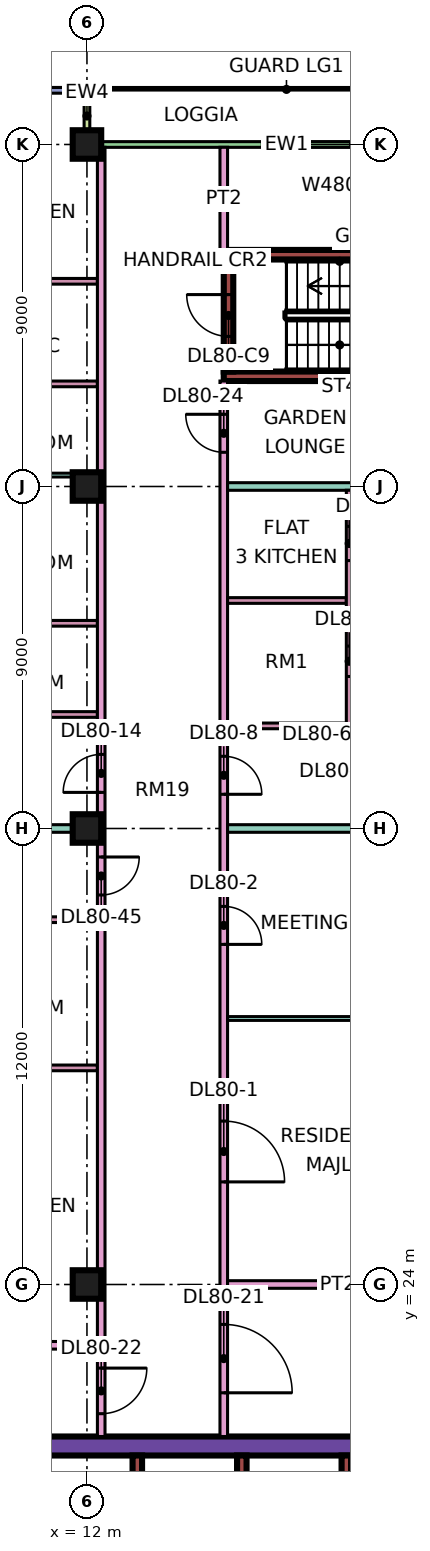
"""IFC4 building model, lengths in metres.
Left out: names, types, materials, properties, quantities, classifications, styles, units other than length and angle.
Written with IfcOpenShell. Run it as: python <this file> out.ifc"""

import sys

from ifc_helpers import new_model, si_unit, direction, frame, frame_2d, origin, origin_2d, place, context, subcontext, project, spatial, rectangle, extrude, element, fill, save


model = new_model("IFC4")
c1 = context("Model", 3, precision=1e-05, world=origin(), true_north=direction((0.0, 1.0)))
c2 = subcontext(c1, "Body", "Model", "MODEL_VIEW")
j1 = project(units=[si_unit("LENGTHUNIT", "METRE"), si_unit("PLANEANGLEUNIT", "RADIAN")], contexts=[c1])
p1 = place(None, origin())
s1 = spatial("IfcSite", under=j1, at=p1, CompositionType="ELEMENT")
p2 = place(p1, origin())
s2 = spatial("IfcBuilding", under=s1, at=p2, CompositionType="ELEMENT")
p3 = place(p2, frame((0.0, 0.0, 346.4)))
s3 = spatial("IfcBuildingStorey", under=s2, at=p3, CompositionType="ELEMENT", Elevation=346.4)
for number, where, z_axis, x_axis in (
    (1, (12.0, 24.0, 0.0), (0.0, 0.0, 1.0), (1.0, 0.0, 0.0)),
    (2, (12.0, 36.0, 0.0), (0.0, 0.0, 1.0), (1.0, 0.0, 0.0)),
    (3, (12.0, 45.0, 0.0), (0.0, 0.0, 1.0), (1.0, 0.0, 0.0)),
    (4, (12.0, 54.0, 0.0), (0.0, 0.0, 1.0), (1.0, 0.0, 0.0)),
):
    element("IfcColumn", number, at=place(p3, frame(where, z_axis=z_axis, x_axis=x_axis)), inside=s3, PredefinedType="COLUMN", context=c2, shape_type="SweptSolid", body=[
        extrude(rectangle(XDim=0.75, YDim=0.75, at=origin_2d()), origin(), (0.0, 0.0, 1.0), 3.75),
    ])
p4 = place(p3, frame((9.0, 19.75, 0.0), z_axis=(0.0, 0.0, 1.0), x_axis=(1.0, 0.0, 0.0)))
e5 = element("IfcWall", 5, at=p4, inside=s3, PredefinedType="SHEAR", context=c2, shape_type="SweptSolid", body=[
    extrude(rectangle(XDim=25.0, YDim=0.5, at=frame_2d((12.5, 0.0))), origin(), (0.0, 0.0, 1.0), 3.75),
])
p5 = place(p4, frame((19.1, 0.0, 0.0)))
e6 = element("IfcOpeningElement", 6, at=p5, cuts=e5, PredefinedType="OPENING", context=c2, shape_type="SweptSolid", body=[
    extrude(rectangle(XDim=1.8, YDim=2.4, at=frame_2d((0.9, 1.2))), frame((0.0, 0.26, 0.0), z_axis=(0.0, -1.0, 0.0), x_axis=(1.0, 0.0, 0.0)), (0.0, 0.0, 1.0), 0.52),
])
p6 = place(p3, frame((13.325, 7.5, 0.0), z_axis=(0.0, 0.0, 1.0), x_axis=(0.0, 1.0, 0.0)))
e7 = element("IfcWall", 7, at=p6, inside=s3, PredefinedType="SHEAR", context=c2, shape_type="SweptSolid", body=[
    extrude(rectangle(XDim=12.0, YDim=0.25, at=frame_2d((6.0, 0.0))), origin(), (0.0, 0.0, 1.0), 3.75),
])
for number, where, z_axis, x_axis in (
    (8, (16.075, 15.8, 0.0), (0.0, 0.0, 1.0), (0.0, 1.0, 0.0)),
    (9, (18.825, 15.8, 0.0), (0.0, 0.0, 1.0), (0.0, 1.0, 0.0)),
):
    element("IfcWall", number, at=place(p3, frame(where, z_axis=z_axis, x_axis=x_axis)), inside=s3, PredefinedType="SHEAR", context=c2, shape_type="SweptSolid", body=[
        extrude(rectangle(XDim=3.7, YDim=0.25, at=frame_2d((1.85, 0.0))), origin(), (0.0, 0.0, 1.0), 3.75),
    ])
for number, where, z_axis, x_axis in (
    (10, (15.6, 47.9, 0.0), (0.0, 0.0, 1.0), (1.0, 0.0, 0.0)),
    (11, (15.6, 51.1, 0.0), (0.0, 0.0, 1.0), (1.0, 0.0, 0.0)),
):
    element("IfcWall", number, at=place(p3, frame(where, z_axis=z_axis, x_axis=x_axis)), inside=s3, PredefinedType="SHEAR", context=c2, shape_type="SweptSolid", body=[
        extrude(rectangle(XDim=7.0, YDim=0.25, at=frame_2d((3.5, 0.0))), origin(), (0.0, 0.0, 1.0), 3.75),
    ])
p7 = place(p3, frame((15.725, 48.025, 0.0), z_axis=(0.0, 0.0, 1.0), x_axis=(0.0, 1.0, 0.0)))
e12 = element("IfcWall", 12, at=p7, inside=s3, PredefinedType="SHEAR", context=c2, shape_type="SweptSolid", body=[
    extrude(rectangle(XDim=2.95, YDim=0.25, at=frame_2d((1.475, 0.0))), origin(), (0.0, 0.0, 1.0), 3.75),
])
p8 = place(p7, frame((0.925, 0.0, 0.0)))
e13 = element("IfcOpeningElement", 13, at=p8, cuts=e12, PredefinedType="OPENING", context=c2, shape_type="SweptSolid", body=[
    extrude(rectangle(XDim=1.1, YDim=2.2, at=frame_2d((0.55, 1.1))), frame((0.0, 0.135, 0.0), z_axis=(0.0, -1.0, 0.0), x_axis=(1.0, 0.0, 0.0)), (0.0, 0.0, 1.0), 0.27),
])
p9 = place(p3, frame((22.425, 54.0, 0.0), z_axis=(0.0, 0.0, 1.0), x_axis=(-1.0, 0.0, 0.0)))
e14 = element("IfcWall", 14, at=p9, inside=s3, PredefinedType="SOLIDWALL", context=c2, shape_type="SweptSolid", body=[
    extrude(rectangle(XDim=10.35, YDim=0.15, at=frame_2d((5.175, 0.0))), origin(), (0.0, 0.0, 1.0), 3.35),
])
p10 = place(p9, frame((1.012, 0.0, 0.45)))
e15 = element("IfcOpeningElement", 15, at=p10, cuts=e14, PredefinedType="OPENING", context=c2, shape_type="SweptSolid", body=[
    extrude(rectangle(XDim=4.8, YDim=2.4, at=frame_2d((2.4, 1.2))), frame((0.0, 0.085, 0.0), z_axis=(0.0, -1.0, 0.0), x_axis=(1.0, 0.0, 0.0)), (0.0, 0.0, 1.0), 0.17),
])
p11 = place(p3, frame((12.0, 55.5, 0.0), z_axis=(0.0, 0.0, 1.0), x_axis=(0.0, -1.0, 0.0)))
e16 = element("IfcWall", 16, at=p11, inside=s3, PredefinedType="SOLIDWALL", context=c2, shape_type="SweptSolid", body=[
    extrude(rectangle(XDim=1.5, YDim=0.15, at=frame_2d((0.75, 0.0))), origin(), (0.0, 0.0, 1.0), 3.35),
])
p12 = place(p3, frame((11.925, 55.425, 0.0), z_axis=(0.0, 0.0, 1.0), x_axis=(-1.0, 0.0, 0.0)))
e17 = element("IfcWall", 17, at=p12, inside=s3, PredefinedType="SOLIDWALL", context=c2, shape_type="SweptSolid", body=[
    extrude(rectangle(XDim=10.425, YDim=0.15, at=frame_2d((5.212, 0.0))), origin(), (0.0, 0.0, 1.0), 3.35),
])
p13 = place(p12, frame((0.975, 0.0, 0.45)))
e18 = element("IfcOpeningElement", 18, at=p13, cuts=e17, PredefinedType="OPENING", context=c2, shape_type="SweptSolid", body=[
    extrude(rectangle(XDim=3.0, YDim=2.4, at=frame_2d((1.5, 1.2))), frame((0.0, 0.085, 0.0), z_axis=(0.0, -1.0, 0.0), x_axis=(1.0, 0.0, 0.0)), (0.0, 0.0, 1.0), 0.17),
])
p14 = place(p12, frame((6.188, 0.0, 0.45)))
e19 = element("IfcOpeningElement", 19, at=p14, cuts=e17, PredefinedType="OPENING", context=c2, shape_type="SweptSolid", body=[
    extrude(rectangle(XDim=3.0, YDim=2.4, at=frame_2d((1.5, 1.2))), frame((0.0, 0.085, 0.0), z_axis=(0.0, -1.0, 0.0), x_axis=(1.0, 0.0, 0.0)), (0.0, 0.0, 1.0), 0.17),
])
p15 = place(p3, frame((0.0, 36.0, 0.0), z_axis=(0.0, 0.0, 1.0), x_axis=(1.0, 0.0, 0.0)))
e20 = element("IfcWall", 20, at=p15, inside=s3, PredefinedType="PARTITIONING", context=c2, shape_type="SweptSolid", body=[
    extrude(rectangle(XDim=12.275, YDim=0.2, at=frame_2d((6.137, 0.0))), origin(), (0.0, 0.0, 1.0), 3.35),
])
p16 = place(p3, frame((0.074, 22.4, 0.0), z_axis=(0.0, 0.0, 1.0), x_axis=(1.0, 0.0, 0.0)))
e21 = element("IfcWall", 21, at=p16, inside=s3, PredefinedType="PARTITIONING", context=c2, shape_type="SweptSolid", body=[
    extrude(rectangle(XDim=12.201, YDim=0.2, at=frame_2d((6.101, 0.0))), origin(), (0.0, 0.0, 1.0), 3.35),
])
p17 = place(p3, frame((7.05, 29.7, 0.0), z_axis=(0.0, 0.0, 1.0), x_axis=(1.0, 0.0, 0.0)))
e22 = element("IfcWall", 22, at=p17, inside=s3, PredefinedType="PARTITIONING", context=c2, shape_type="SweptSolid", body=[
    extrude(rectangle(XDim=5.225, YDim=0.15, at=frame_2d((2.612, 0.0))), origin(), (0.0, 0.0, 1.0), 3.35),
])
p18 = place(p3, frame((7.05, 33.6, 0.0), z_axis=(0.0, 0.0, 1.0), x_axis=(1.0, 0.0, 0.0)))
e23 = element("IfcWall", 23, at=p18, inside=s3, PredefinedType="PARTITIONING", context=c2, shape_type="SweptSolid", body=[
    extrude(rectangle(XDim=5.225, YDim=0.15, at=frame_2d((2.612, 0.0))), origin(), (0.0, 0.0, 1.0), 3.35),
])
p19 = place(p18, frame((2.175, 0.0, 0.0)))
e24 = element("IfcOpeningElement", 24, at=p19, cuts=e23, PredefinedType="OPENING", context=c2, shape_type="SweptSolid", body=[
    extrude(rectangle(XDim=0.8, YDim=2.1, at=frame_2d((0.4, 1.05))), frame((0.0, 0.085, 0.0), z_axis=(0.0, -1.0, 0.0), x_axis=(1.0, 0.0, 0.0)), (0.0, 0.0, 1.0), 0.17),
])
for number, where, z_axis, x_axis in (
    (25, (7.05, 39.0, 0.0), (0.0, 0.0, 1.0), (1.0, 0.0, 0.0)),
    (26, (7.05, 41.4, 0.0), (0.0, 0.0, 1.0), (1.0, 0.0, 0.0)),
):
    element("IfcWall", number, at=place(p3, frame(where, z_axis=z_axis, x_axis=x_axis)), inside=s3, PredefinedType="PARTITIONING", context=c2, shape_type="SweptSolid", body=[
        extrude(rectangle(XDim=5.225, YDim=0.15, at=frame_2d((2.612, 0.0))), origin(), (0.0, 0.0, 1.0), 3.35),
    ])
p20 = place(p3, frame((7.05, 45.3, 0.0), z_axis=(0.0, 0.0, 1.0), x_axis=(1.0, 0.0, 0.0)))
e27 = element("IfcWall", 27, at=p20, inside=s3, PredefinedType="PARTITIONING", context=c2, shape_type="SweptSolid", body=[
    extrude(rectangle(XDim=5.225, YDim=0.1, at=frame_2d((2.612, 0.0))), origin(), (0.0, 0.0, 1.0), 3.35),
])
for number, where, z_axis, x_axis in (
    (28, (7.05, 47.7, 0.0), (0.0, 0.0, 1.0), (1.0, 0.0, 0.0)),
    (29, (7.05, 50.4, 0.0), (0.0, 0.0, 1.0), (1.0, 0.0, 0.0)),
):
    element("IfcWall", number, at=place(p3, frame(where, z_axis=z_axis, x_axis=x_axis)), inside=s3, PredefinedType="PARTITIONING", context=c2, shape_type="SweptSolid", body=[
        extrude(rectangle(XDim=5.225, YDim=0.15, at=frame_2d((2.612, 0.0))), origin(), (0.0, 0.0, 1.0), 3.35),
    ])
p21 = place(p3, frame((12.375, 20.0, 0.0), z_axis=(0.0, 0.0, 1.0), x_axis=(0.0, 1.0, 0.0)))
e30 = element("IfcWall", 30, at=p21, inside=s3, PredefinedType="PARTITIONING", context=c2, shape_type="SweptSolid", body=[
    extrude(rectangle(XDim=33.926, YDim=0.2, at=frame_2d((16.963, 0.0))), origin(), (0.0, 0.0, 1.0), 3.35),
])
p22 = place(p21, frame((16.95, 0.0, 0.0)))
e31 = element("IfcOpeningElement", 31, at=p22, cuts=e30, PredefinedType="OPENING", context=c2, shape_type="SweptSolid", body=[
    extrude(rectangle(XDim=1.0, YDim=2.1, at=frame_2d((0.5, 1.05))), frame((0.0, 0.11, 0.0), z_axis=(0.0, -1.0, 0.0), x_axis=(1.0, 0.0, 0.0)), (0.0, 0.0, 1.0), 0.22),
])
p23 = place(p21, frame((0.6, 0.0, 0.0)))
e32 = element("IfcOpeningElement", 32, at=p23, cuts=e30, PredefinedType="OPENING", context=c2, shape_type="SweptSolid", body=[
    extrude(rectangle(XDim=1.2, YDim=2.1, at=frame_2d((0.6, 1.05))), frame((0.0, 0.11, 0.0), z_axis=(0.0, -1.0, 0.0), x_axis=(1.0, 0.0, 0.0)), (0.0, 0.0, 1.0), 0.22),
])
p24 = place(p21, frame((14.25, 0.0, 0.0)))
e33 = element("IfcOpeningElement", 33, at=p24, cuts=e30, PredefinedType="OPENING", context=c2, shape_type="SweptSolid", body=[
    extrude(rectangle(XDim=1.0, YDim=2.1, at=frame_2d((0.5, 1.05))), frame((0.0, 0.11, 0.0), z_axis=(0.0, -1.0, 0.0), x_axis=(1.0, 0.0, 0.0)), (0.0, 0.0, 1.0), 0.22),
])
p25 = place(p3, frame((15.6, 20.0, 0.0), z_axis=(0.0, 0.0, 1.0), x_axis=(0.0, 1.0, 0.0)))
e34 = element("IfcWall", 34, at=p25, inside=s3, PredefinedType="PARTITIONING", context=c2, shape_type="SweptSolid", body=[
    extrude(rectangle(XDim=27.775, YDim=0.2, at=frame_2d((13.887, 0.0))), origin(), (0.0, 0.0, 1.0), 3.35),
])
p26 = place(p25, frame((6.7, 0.0, 0.0)))
e35 = element("IfcOpeningElement", 35, at=p26, cuts=e34, PredefinedType="OPENING", context=c2, shape_type="SweptSolid", body=[
    extrude(rectangle(XDim=1.6, YDim=2.1, at=frame_2d((0.8, 1.05))), frame((0.0, 0.11, 0.0), z_axis=(0.0, -1.0, 0.0), x_axis=(1.0, 0.0, 0.0)), (0.0, 0.0, 1.0), 0.22),
])
p27 = place(p25, frame((12.95, 0.0, 0.0)))
e36 = element("IfcOpeningElement", 36, at=p27, cuts=e34, PredefinedType="OPENING", context=c2, shape_type="SweptSolid", body=[
    extrude(rectangle(XDim=1.0, YDim=2.1, at=frame_2d((0.5, 1.05))), frame((0.0, 0.11, 0.0), z_axis=(0.0, -1.0, 0.0), x_axis=(1.0, 0.0, 0.0)), (0.0, 0.0, 1.0), 0.22),
])
p28 = place(p25, frame((16.9, 0.0, 0.0)))
e37 = element("IfcOpeningElement", 37, at=p28, cuts=e34, PredefinedType="OPENING", context=c2, shape_type="SweptSolid", body=[
    extrude(rectangle(XDim=1.0, YDim=2.1, at=frame_2d((0.5, 1.05))), frame((0.0, 0.11, 0.0), z_axis=(0.0, -1.0, 0.0), x_axis=(1.0, 0.0, 0.0)), (0.0, 0.0, 1.0), 0.22),
])
p29 = place(p25, frame((1.15, 0.0, 0.0)))
e38 = element("IfcOpeningElement", 38, at=p29, cuts=e34, PredefinedType="OPENING", context=c2, shape_type="SweptSolid", body=[
    extrude(rectangle(XDim=1.8, YDim=2.1, at=frame_2d((0.9, 1.05))), frame((0.0, 0.11, 0.0), z_axis=(0.0, -1.0, 0.0), x_axis=(1.0, 0.0, 0.0)), (0.0, 0.0, 1.0), 0.22),
])
p30 = place(p25, frame((25.9, 0.0, 0.0)))
e39 = element("IfcOpeningElement", 39, at=p30, cuts=e34, PredefinedType="OPENING", context=c2, shape_type="SweptSolid", body=[
    extrude(rectangle(XDim=1.0, YDim=2.1, at=frame_2d((0.5, 1.05))), frame((0.0, 0.11, 0.0), z_axis=(0.0, -1.0, 0.0), x_axis=(1.0, 0.0, 0.0)), (0.0, 0.0, 1.0), 0.22),
])
p31 = place(p3, frame((15.6, 51.225, 0.0), z_axis=(0.0, 0.0, 1.0), x_axis=(0.0, 1.0, 0.0)))
e40 = element("IfcWall", 40, at=p31, inside=s3, PredefinedType="PARTITIONING", context=c2, shape_type="SweptSolid", body=[
    extrude(rectangle(XDim=2.701, YDim=0.2, at=frame_2d((1.351, 0.0))), origin(), (0.0, 0.0, 1.0), 3.35),
])
p32 = place(p3, frame((15.7, 24.0, 0.0), z_axis=(0.0, 0.0, 1.0), x_axis=(1.0, 0.0, 0.0)))
e41 = element("IfcWall", 41, at=p32, inside=s3, PredefinedType="PARTITIONING", context=c2, shape_type="SweptSolid", body=[
    extrude(rectangle(XDim=5.8, YDim=0.2, at=frame_2d((2.9, 0.0))), origin(), (0.0, 0.0, 1.0), 3.35),
])
p33 = place(p3, frame((15.7, 31.0, 0.0), z_axis=(0.0, 0.0, 1.0), x_axis=(1.0, 0.0, 0.0)))
e42 = element("IfcWall", 42, at=p33, inside=s3, PredefinedType="PARTITIONING", context=c2, shape_type="SweptSolid", body=[
    extrude(rectangle(XDim=5.8, YDim=0.1, at=frame_2d((2.9, 0.0))), origin(), (0.0, 0.0, 1.0), 3.35),
])
p34 = place(p3, frame((15.7, 36.0, 0.0), z_axis=(0.0, 0.0, 1.0), x_axis=(1.0, 0.0, 0.0)))
e43 = element("IfcWall", 43, at=p34, inside=s3, PredefinedType="PARTITIONING", context=c2, shape_type="SweptSolid", body=[
    extrude(rectangle(XDim=8.3, YDim=0.2, at=frame_2d((4.15, 0.0))), origin(), (0.0, 0.0, 1.0), 3.35),
])
for number, where, z_axis, x_axis in (
    (44, (15.7, 38.7, 0.0), (0.0, 0.0, 1.0), (1.0, 0.0, 0.0)),
    (45, (15.7, 42.0, 0.0), (0.0, 0.0, 1.0), (1.0, 0.0, 0.0)),
):
    element("IfcWall", number, at=place(p3, frame(where, z_axis=z_axis, x_axis=x_axis)), inside=s3, PredefinedType="PARTITIONING", context=c2, shape_type="SweptSolid", body=[
        extrude(rectangle(XDim=3.125, YDim=0.15, at=frame_2d((1.562, 0.0))), origin(), (0.0, 0.0, 1.0), 3.35),
    ])
p35 = place(p3, frame((15.7, 45.0, 0.0), z_axis=(0.0, 0.0, 1.0), x_axis=(1.0, 0.0, 0.0)))
e46 = element("IfcWall", 46, at=p35, inside=s3, PredefinedType="PARTITIONING", context=c2, shape_type="SweptSolid", body=[
    extrude(rectangle(XDim=8.226, YDim=0.2, at=frame_2d((4.113, 0.0))), origin(), (0.0, 0.0, 1.0), 3.35),
])
p36 = place(p3, frame((18.9, 38.625, 0.0), z_axis=(0.0, 0.0, 1.0), x_axis=(0.0, 1.0, 0.0)))
e47 = element("IfcWall", 47, at=p36, inside=s3, PredefinedType="PARTITIONING", context=c2, shape_type="SweptSolid", body=[
    extrude(rectangle(XDim=6.275, YDim=0.15, at=frame_2d((3.137, 0.0))), origin(), (0.0, 0.0, 1.0), 3.35),
])
p37 = place(p36, frame((1.375, 0.0, 0.0)))
e48 = element("IfcOpeningElement", 48, at=p37, cuts=e47, PredefinedType="OPENING", context=c2, shape_type="SweptSolid", body=[
    extrude(rectangle(XDim=0.8, YDim=2.1, at=frame_2d((0.4, 1.05))), frame((0.0, 0.085, 0.0), z_axis=(0.0, -1.0, 0.0), x_axis=(1.0, 0.0, 0.0)), (0.0, 0.0, 1.0), 0.17),
])
p38 = place(p36, frame((4.425, 0.0, 0.0)))
e49 = element("IfcOpeningElement", 49, at=p38, cuts=e47, PredefinedType="OPENING", context=c2, shape_type="SweptSolid", body=[
    extrude(rectangle(XDim=0.9, YDim=2.1, at=frame_2d((0.45, 1.05))), frame((0.0, 0.085, 0.0), z_axis=(0.0, -1.0, 0.0), x_axis=(1.0, 0.0, 0.0)), (0.0, 0.0, 1.0), 0.17),
])
p39 = place(p10, origin())
e50 = element("IfcWindow", 50, at=p39, inside=s3, PartitioningType="SINGLE_PANEL", PredefinedType="WINDOW", context=c2, shape_type="SweptSolid", body=[
    extrude(rectangle(XDim=4.8, YDim=2.4, at=frame_2d((2.4, 1.2))), frame((0.0, 0.03, 0.0), z_axis=(0.0, -1.0, 0.0), x_axis=(1.0, 0.0, 0.0)), (0.0, 0.0, 1.0), 0.06),
])
fill(e15, e50)
p40 = place(p8, frame((1.1, 0.0, 0.0), z_axis=(0.0, 0.0, 1.0), x_axis=(-1.0, 0.0, 0.0)))
e51 = element("IfcDoor", 51, at=p40, inside=s3, OperationType="SINGLE_SWING_RIGHT", PredefinedType="DOOR", context=c2, shape_type="SweptSolid", body=[
    extrude(rectangle(XDim=1.1, YDim=2.2, at=frame_2d((0.55, 1.1))), frame((0.0, 0.025, 0.0), z_axis=(0.0, -1.0, 0.0), x_axis=(1.0, 0.0, 0.0)), (0.0, 0.0, 1.0), 0.05),
])
fill(e13, e51)
p41 = place(p26, frame((1.6, 0.0, 0.0), z_axis=(0.0, 0.0, 1.0), x_axis=(-1.0, 0.0, 0.0)))
e52 = element("IfcDoor", 52, at=p41, inside=s3, OperationType="DOUBLE_DOOR_SINGLE_SWING", PredefinedType="DOOR", context=c2, shape_type="SweptSolid", body=[
    extrude(rectangle(XDim=1.6, YDim=2.1, at=frame_2d((0.8, 1.05))), frame((0.0, 0.025, 0.0), z_axis=(0.0, -1.0, 0.0), x_axis=(1.0, 0.0, 0.0)), (0.0, 0.0, 1.0), 0.05),
])
fill(e35, e52)
p42 = place(p27, frame((1.0, 0.0, 0.0), z_axis=(0.0, 0.0, 1.0), x_axis=(-1.0, 0.0, 0.0)))
e53 = element("IfcDoor", 53, at=p42, inside=s3, OperationType="SINGLE_SWING_LEFT", PredefinedType="DOOR", context=c2, shape_type="SweptSolid", body=[
    extrude(rectangle(XDim=1.0, YDim=2.1, at=frame_2d((0.5, 1.05))), frame((0.0, 0.025, 0.0), z_axis=(0.0, -1.0, 0.0), x_axis=(1.0, 0.0, 0.0)), (0.0, 0.0, 1.0), 0.05),
])
fill(e36, e53)
p43 = place(p37, origin())
e54 = element("IfcDoor", 54, at=p43, inside=s3, OperationType="SINGLE_SWING_RIGHT", PredefinedType="DOOR", context=c2, shape_type="SweptSolid", body=[
    extrude(rectangle(XDim=0.8, YDim=2.1, at=frame_2d((0.4, 1.05))), frame((0.0, 0.025, 0.0), z_axis=(0.0, -1.0, 0.0), x_axis=(1.0, 0.0, 0.0)), (0.0, 0.0, 1.0), 0.05),
])
fill(e48, e54)
p44 = place(p38, origin())
e55 = element("IfcDoor", 55, at=p44, inside=s3, OperationType="SINGLE_SWING_RIGHT", PredefinedType="DOOR", context=c2, shape_type="SweptSolid", body=[
    extrude(rectangle(XDim=0.9, YDim=2.1, at=frame_2d((0.45, 1.05))), frame((0.0, 0.025, 0.0), z_axis=(0.0, -1.0, 0.0), x_axis=(1.0, 0.0, 0.0)), (0.0, 0.0, 1.0), 0.05),
])
fill(e49, e55)
p45 = place(p28, frame((1.0, 0.0, 0.0), z_axis=(0.0, 0.0, 1.0), x_axis=(-1.0, 0.0, 0.0)))
e56 = element("IfcDoor", 56, at=p45, inside=s3, OperationType="SINGLE_SWING_LEFT", PredefinedType="DOOR", context=c2, shape_type="SweptSolid", body=[
    extrude(rectangle(XDim=1.0, YDim=2.1, at=frame_2d((0.5, 1.05))), frame((0.0, 0.025, 0.0), z_axis=(0.0, -1.0, 0.0), x_axis=(1.0, 0.0, 0.0)), (0.0, 0.0, 1.0), 0.05),
])
fill(e37, e56)
p46 = place(p22, origin())
e57 = element("IfcDoor", 57, at=p46, inside=s3, OperationType="SINGLE_SWING_LEFT", PredefinedType="DOOR", context=c2, shape_type="SweptSolid", body=[
    extrude(rectangle(XDim=1.0, YDim=2.1, at=frame_2d((0.5, 1.05))), frame((0.0, 0.025, 0.0), z_axis=(0.0, -1.0, 0.0), x_axis=(1.0, 0.0, 0.0)), (0.0, 0.0, 1.0), 0.05),
])
fill(e31, e57)
p47 = place(p29, frame((1.8, 0.0, 0.0), z_axis=(0.0, 0.0, 1.0), x_axis=(-1.0, 0.0, 0.0)))
e58 = element("IfcDoor", 58, at=p47, inside=s3, OperationType="DOUBLE_DOOR_SINGLE_SWING", PredefinedType="DOOR", context=c2, shape_type="SweptSolid", body=[
    extrude(rectangle(XDim=1.8, YDim=2.1, at=frame_2d((0.9, 1.05))), frame((0.0, 0.025, 0.0), z_axis=(0.0, -1.0, 0.0), x_axis=(1.0, 0.0, 0.0)), (0.0, 0.0, 1.0), 0.05),
])
fill(e38, e58)
p48 = place(p23, origin())
e59 = element("IfcDoor", 59, at=p48, inside=s3, OperationType="SINGLE_SWING_RIGHT", PredefinedType="DOOR", context=c2, shape_type="SweptSolid", body=[
    extrude(rectangle(XDim=1.2, YDim=2.1, at=frame_2d((0.6, 1.05))), frame((0.0, 0.025, 0.0), z_axis=(0.0, -1.0, 0.0), x_axis=(1.0, 0.0, 0.0)), (0.0, 0.0, 1.0), 0.05),
])
fill(e32, e59)
p49 = place(p30, frame((1.0, 0.0, 0.0), z_axis=(0.0, 0.0, 1.0), x_axis=(-1.0, 0.0, 0.0)))
e60 = element("IfcDoor", 60, at=p49, inside=s3, OperationType="SINGLE_SWING_RIGHT", PredefinedType="DOOR", context=c2, shape_type="SweptSolid", body=[
    extrude(rectangle(XDim=1.0, YDim=2.1, at=frame_2d((0.5, 1.05))), frame((0.0, 0.025, 0.0), z_axis=(0.0, -1.0, 0.0), x_axis=(1.0, 0.0, 0.0)), (0.0, 0.0, 1.0), 0.05),
])
fill(e39, e60)
p50 = place(p24, origin())
e61 = element("IfcDoor", 61, at=p50, inside=s3, OperationType="SINGLE_SWING_RIGHT", PredefinedType="DOOR", context=c2, shape_type="SweptSolid", body=[
    extrude(rectangle(XDim=1.0, YDim=2.1, at=frame_2d((0.5, 1.05))), frame((0.0, 0.025, 0.0), z_axis=(0.0, -1.0, 0.0), x_axis=(1.0, 0.0, 0.0)), (0.0, 0.0, 1.0), 0.05),
])
fill(e33, e61)
save(model, sys.argv[1])
